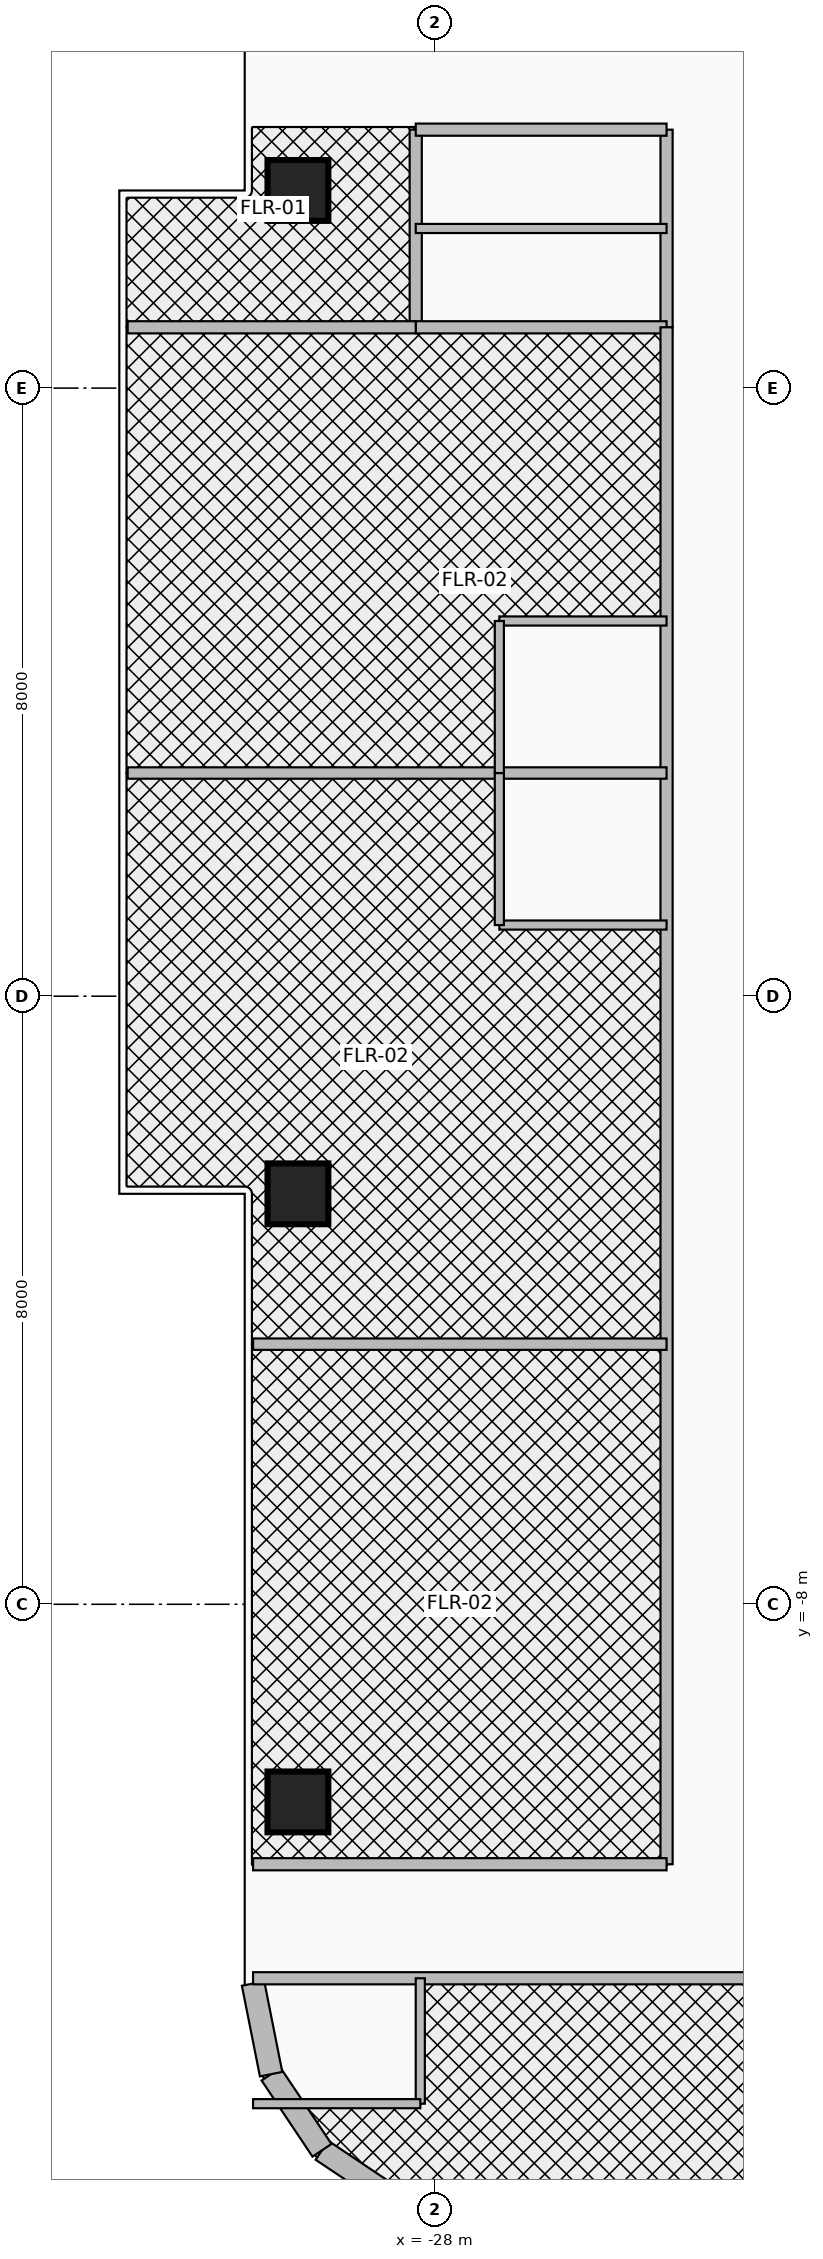
"""IFC4 building model, lengths in metres.
Left out: names, types, materials, properties, quantities, classifications, styles, units other than length and angle.
Written with IfcOpenShell. Run it as: python <this file> out.ifc"""

import sys

from ifc_helpers import new_model, si_unit, direction, frame, frame_2d, origin, origin_2d, place, context, subcontext, project, spatial, rectangle, extrude, source, transform, mapped, element, fill, save


model = new_model("IFC4")
c1 = context("Model", 3, precision=1e-05, world=origin(), true_north=direction((0.0, 1.0)))
c2 = subcontext(c1, "Body", "Model", "MODEL_VIEW")
j1 = project(units=[si_unit("LENGTHUNIT", "METRE"), si_unit("PLANEANGLEUNIT", "RADIAN")], contexts=[c1])
p1 = place(None, origin())
s1 = spatial("IfcSite", under=j1, at=p1, CompositionType="ELEMENT")
p2 = place(p1, origin())
s2 = spatial("IfcBuilding", under=s1, at=p2, CompositionType="ELEMENT")
p3 = place(p2, frame((0.0, 0.0, 240.5)))
s3 = spatial("IfcBuildingStorey", under=s2, at=p3, CompositionType="ELEMENT", Elevation=240.5)
m1 = source(origin(), c2, "Body", "SweptSolid", [
    extrude(rectangle(XDim=0.8, YDim=0.8, at=origin_2d()), origin(), (0.0, 0.0, 1.0), 3.5),
])
for number, where, z_axis, x_axis in (
    (1, (-29.8, -10.6, 0.0), (0.0, 0.0, 1.0), (1.0, 0.0, 0.0)),
    (2, (-29.8, -2.6, 0.0), (0.0, 0.0, 1.0), (1.0, 0.0, 0.0)),
    (3, (-29.8, 10.6, 0.0), (0.0, 0.0, 1.0), (1.0, 0.0, 0.0)),
):
    element("IfcColumn", number, at=place(p3, frame(where, z_axis=z_axis, x_axis=x_axis)), inside=s3, PredefinedType="COLUMN", context=c2, shape_type="MappedRepresentation", body=[
        mapped(m1, transform((0.0, 0.0, 0.0), x_axis=(1.0, 0.0, 0.0), y_axis=(0.0, 1.0, 0.0), z_axis=(0.0, 0.0, 1.0), scale=1.0)),
    ])
for number, where, z_axis, x_axis in (
    (4, (-28.482, -15.853, 0.0), (0.0, 0.0, 1.0), (-0.831, 0.556, 0.0)),
    (5, (-29.483, -15.183, 0.0), (0.0, 0.0, 1.0), (-0.556, 0.831, 0.0)),
):
    element("IfcWall", number, at=place(p3, frame(where, z_axis=z_axis, x_axis=x_axis)), inside=s3, PredefinedType="SOLIDWALL", context=c2, shape_type="SweptSolid", body=[
        extrude(rectangle(XDim=1.205, YDim=0.3, at=frame_2d((0.603, 0.0))), origin(), (0.0, 0.0, 1.0), 3.26),
    ])
p4 = place(p3, frame((-30.153, -14.182, 0.0), z_axis=(0.0, 0.0, 1.0), x_axis=(-0.194996050505, 0.980804027463, 0.0)))
e6 = element("IfcWall", 6, at=p4, inside=s3, PredefinedType="SOLIDWALL", context=c2, shape_type="SweptSolid", body=[
    extrude(rectangle(XDim=1.216, YDim=0.3, at=frame_2d((0.608, 0.0))), origin(), (0.0, 0.0, 1.0), 3.26),
])
p5 = place(p3, frame((-28.25, 8.8, 0.0), z_axis=(0.0, 0.0, 1.0), x_axis=(0.0, 1.0, 0.0)))
e7 = element("IfcWall", 7, at=p5, inside=s3, PredefinedType="PARTITIONING", context=c2, shape_type="SweptSolid", body=[
    extrude(rectangle(XDim=2.6, YDim=0.16, at=frame_2d((1.3, 0.0))), origin(), (0.0, 0.0, 1.0), 2.544),
])
p6 = place(p3, frame((-24.95, 8.8, 0.0), z_axis=(0.0, 0.0, 1.0), x_axis=(0.0, 1.0, 0.0)))
e8 = element("IfcWall", 8, at=p6, inside=s3, PredefinedType="PARTITIONING", context=c2, shape_type="SweptSolid", body=[
    extrude(rectangle(XDim=2.6, YDim=0.16, at=frame_2d((1.3, 0.0))), origin(), (0.0, 0.0, 1.0), 2.544),
])
p7 = place(p6, frame((0.3, 0.0, 0.0)))
e9 = element("IfcOpeningElement", 9, at=p7, cuts=e8, PredefinedType="OPENING", context=c2, shape_type="SweptSolid", body=[
    extrude(rectangle(XDim=0.85, YDim=2.1, at=frame_2d((0.425, 1.05))), frame((0.0, 0.095, 0.0), z_axis=(0.0, -1.0, 0.0), x_axis=(1.0, 0.0, 0.0)), (0.0, 0.0, 1.0), 0.19),
])
p8 = place(p6, frame((1.45, 0.0, 0.0)))
e10 = element("IfcOpeningElement", 10, at=p8, cuts=e8, PredefinedType="OPENING", context=c2, shape_type="SweptSolid", body=[
    extrude(rectangle(XDim=0.85, YDim=2.1, at=frame_2d((0.425, 1.05))), frame((0.0, 0.095, 0.0), z_axis=(0.0, -1.0, 0.0), x_axis=(1.0, 0.0, 0.0)), (0.0, 0.0, 1.0), 0.19),
])
for number, where, z_axis, x_axis in (
    (11, (-28.25, 8.8, 0.0), (0.0, 0.0, 1.0), (1.0, 0.0, 0.0)),
    (12, (-28.25, 11.4, 0.0), (0.0, 0.0, 1.0), (1.0, 0.0, 0.0)),
):
    element("IfcWall", number, at=place(p3, frame(where, z_axis=z_axis, x_axis=x_axis)), inside=s3, PredefinedType="PARTITIONING", context=c2, shape_type="SweptSolid", body=[
        extrude(rectangle(XDim=3.3, YDim=0.16, at=frame_2d((1.65, 0.0))), origin(), (0.0, 0.0, 1.0), 3.26),
    ])
p9 = place(p3, frame((-28.25, 10.1, 0.0), z_axis=(0.0, 0.0, 1.0), x_axis=(1.0, 0.0, 0.0)))
e13 = element("IfcWall", 13, at=p9, inside=s3, PredefinedType="PARTITIONING", context=c2, shape_type="SweptSolid", body=[
    extrude(rectangle(XDim=3.3, YDim=0.12, at=frame_2d((1.65, 0.0))), origin(), (0.0, 0.0, 1.0), 3.26),
])
p10 = place(p3, frame((-24.95, -11.42, 0.0), z_axis=(0.0, 0.0, 1.0), x_axis=(0.0, 1.0, 0.0)))
e14 = element("IfcWall", 14, at=p10, inside=s3, PredefinedType="PARTITIONING", context=c2, shape_type="SweptSolid", body=[
    extrude(rectangle(XDim=20.22, YDim=0.16, at=frame_2d((10.11, 0.0))), origin(), (0.0, 0.0, 1.0), 2.544),
])
p11 = place(p10, frame((2.521, 0.0, 0.0)))
e15 = element("IfcOpeningElement", 15, at=p11, cuts=e14, PredefinedType="OPENING", context=c2, shape_type="SweptSolid", body=[
    extrude(rectangle(XDim=1.8, YDim=2.15, at=frame_2d((0.9, 1.075))), frame((0.0, 0.095, 0.0), z_axis=(0.0, -1.0, 0.0), x_axis=(1.0, 0.0, 0.0)), (0.0, 0.0, 1.0), 0.19),
])
p12 = place(p10, frame((9.124, 0.0, 0.0)))
e16 = element("IfcOpeningElement", 16, at=p12, cuts=e14, PredefinedType="OPENING", context=c2, shape_type="SweptSolid", body=[
    extrude(rectangle(XDim=0.95, YDim=2.15, at=frame_2d((0.475, 1.075))), frame((0.0, 0.095, 0.0), z_axis=(0.0, -1.0, 0.0), x_axis=(1.0, 0.0, 0.0)), (0.0, 0.0, 1.0), 0.19),
])
p13 = place(p10, frame((17.813, 0.0, 0.0)))
e17 = element("IfcOpeningElement", 17, at=p13, cuts=e14, PredefinedType="OPENING", context=c2, shape_type="SweptSolid", body=[
    extrude(rectangle(XDim=0.95, YDim=2.15, at=frame_2d((0.475, 1.075))), frame((0.0, 0.095, 0.0), z_axis=(0.0, -1.0, 0.0), x_axis=(1.0, 0.0, 0.0)), (0.0, 0.0, 1.0), 0.19),
])
p14 = place(p3, frame((-32.04, 8.8, 0.0), z_axis=(0.0, 0.0, 1.0), x_axis=(1.0, 0.0, 0.0)))
e18 = element("IfcWall", 18, at=p14, inside=s3, PredefinedType="PARTITIONING", context=c2, shape_type="SweptSolid", body=[
    extrude(rectangle(XDim=3.79, YDim=0.16, at=frame_2d((1.895, 0.0))), origin(), (0.0, 0.0, 1.0), 2.706),
])
p15 = place(p14, frame((1.445, 0.0, 0.0)))
e19 = element("IfcOpeningElement", 19, at=p15, cuts=e18, PredefinedType="OPENING", context=c2, shape_type="SweptSolid", body=[
    extrude(rectangle(XDim=0.9, YDim=2.1, at=frame_2d((0.45, 1.05))), frame((0.0, 0.095, 0.0), z_axis=(0.0, -1.0, 0.0), x_axis=(1.0, 0.0, 0.0)), (0.0, 0.0, 1.0), 0.19),
])
p16 = place(p3, frame((-30.39, -4.578, 0.0), z_axis=(0.0, 0.0, 1.0), x_axis=(1.0, 0.0, 0.0)))
e20 = element("IfcWall", 20, at=p16, inside=s3, PredefinedType="PARTITIONING", context=c2, shape_type="SweptSolid", body=[
    extrude(rectangle(XDim=5.44, YDim=0.15, at=frame_2d((2.72, 0.0))), origin(), (0.0, 0.0, 1.0), 2.706),
])
p17 = place(p3, frame((-32.04, 2.936, 0.0), z_axis=(0.0, 0.0, 1.0), x_axis=(1.0, 0.0, 0.0)))
e21 = element("IfcWall", 21, at=p17, inside=s3, PredefinedType="PARTITIONING", context=c2, shape_type="SweptSolid", body=[
    extrude(rectangle(XDim=7.09, YDim=0.15, at=frame_2d((3.545, 0.0))), origin(), (0.0, 0.0, 1.0), 2.706),
])
p18 = place(p3, frame((-27.15, 0.936, 0.0), z_axis=(0.0, 0.0, 1.0), x_axis=(1.0, 0.0, 0.0)))
e22 = element("IfcWall", 22, at=p18, inside=s3, PredefinedType="PARTITIONING", context=c2, shape_type="SweptSolid", body=[
    extrude(rectangle(XDim=2.2, YDim=0.12, at=frame_2d((1.1, 0.0))), origin(), (0.0, 0.0, 1.0), 2.839),
])
p19 = place(p3, frame((-27.15, 0.936, 0.0), z_axis=(0.0, 0.0, 1.0), x_axis=(0.0, 1.0, 0.0)))
e23 = element("IfcWall", 23, at=p19, inside=s3, PredefinedType="PARTITIONING", context=c2, shape_type="SweptSolid", body=[
    extrude(rectangle(XDim=2.0, YDim=0.12, at=frame_2d((1.0, 0.0))), origin(), (0.0, 0.0, 1.0), 2.839),
])
p20 = place(p19, frame((0.575, 0.0, 0.0)))
e24 = element("IfcOpeningElement", 24, at=p20, cuts=e23, PredefinedType="OPENING", context=c2, shape_type="SweptSolid", body=[
    extrude(rectangle(XDim=0.85, YDim=2.1, at=frame_2d((0.425, 1.05))), frame((0.0, 0.075, 0.0), z_axis=(0.0, -1.0, 0.0), x_axis=(1.0, 0.0, 0.0)), (0.0, 0.0, 1.0), 0.15),
])
p21 = place(p3, frame((-27.15, 4.936, 0.0), z_axis=(0.0, 0.0, 1.0), x_axis=(1.0, 0.0, 0.0)))
e25 = element("IfcWall", 25, at=p21, inside=s3, PredefinedType="PARTITIONING", context=c2, shape_type="SweptSolid", body=[
    extrude(rectangle(XDim=2.2, YDim=0.12, at=frame_2d((1.1, 0.0))), origin(), (0.0, 0.0, 1.0), 3.26),
])
p22 = place(p3, frame((-27.15, 2.936, 0.0), z_axis=(0.0, 0.0, 1.0), x_axis=(0.0, 1.0, 0.0)))
e26 = element("IfcWall", 26, at=p22, inside=s3, PredefinedType="PARTITIONING", context=c2, shape_type="SweptSolid", body=[
    extrude(rectangle(XDim=2.0, YDim=0.12, at=frame_2d((1.0, 0.0))), origin(), (0.0, 0.0, 1.0), 2.839),
])
p23 = place(p22, frame((0.575, 0.0, 0.0)))
e27 = element("IfcOpeningElement", 27, at=p23, cuts=e26, PredefinedType="OPENING", context=c2, shape_type="SweptSolid", body=[
    extrude(rectangle(XDim=0.85, YDim=2.1, at=frame_2d((0.425, 1.05))), frame((0.0, 0.075, 0.0), z_axis=(0.0, -1.0, 0.0), x_axis=(1.0, 0.0, 0.0)), (0.0, 0.0, 1.0), 0.15),
])
p24 = place(p3, frame((-30.39, -12.92, 0.0), z_axis=(0.0, 0.0, 1.0), x_axis=(1.0, 0.0, 0.0)))
e28 = element("IfcWall", 28, at=p24, inside=s3, PredefinedType="PARTITIONING", context=c2, shape_type="SweptSolid", body=[
    extrude(rectangle(XDim=20.78, YDim=0.16, at=frame_2d((10.39, 0.0))), origin(), (0.0, 0.0, 1.0), 2.634),
])
p25 = place(p24, frame((6.5, 0.0, 0.0)))
e29 = element("IfcOpeningElement", 29, at=p25, cuts=e28, PredefinedType="OPENING", context=c2, shape_type="SweptSolid", body=[
    extrude(rectangle(XDim=0.95, YDim=2.15, at=frame_2d((0.475, 1.075))), frame((0.0, 0.095, 0.0), z_axis=(0.0, -1.0, 0.0), x_axis=(1.0, 0.0, 0.0)), (0.0, 0.0, 1.0), 0.19),
])
p26 = place(p24, frame((16.73, 0.0, 0.0)))
e30 = element("IfcOpeningElement", 30, at=p26, cuts=e28, PredefinedType="OPENING", context=c2, shape_type="SweptSolid", body=[
    extrude(rectangle(XDim=0.95, YDim=2.15, at=frame_2d((0.475, 1.075))), frame((0.0, 0.095, 0.0), z_axis=(0.0, -1.0, 0.0), x_axis=(1.0, 0.0, 0.0)), (0.0, 0.0, 1.0), 0.19),
])
p27 = place(p3, frame((-28.19, -14.57, 0.0), z_axis=(0.0, 0.0, 1.0), x_axis=(0.0, 1.0, 0.0)))
e31 = element("IfcWall", 31, at=p27, inside=s3, PredefinedType="PARTITIONING", context=c2, shape_type="SweptSolid", body=[
    extrude(rectangle(XDim=1.65, YDim=0.12, at=frame_2d((0.825, 0.0))), origin(), (0.0, 0.0, 1.0), 3.26),
])
p28 = place(p3, frame((-30.39, -14.57, 0.0), z_axis=(0.0, 0.0, 1.0), x_axis=(1.0, 0.0, 0.0)))
e32 = element("IfcWall", 32, at=p28, inside=s3, PredefinedType="PARTITIONING", context=c2, shape_type="SweptSolid", body=[
    extrude(rectangle(XDim=2.2, YDim=0.12, at=frame_2d((1.1, 0.0))), origin(), (0.0, 0.0, 1.0), 3.26),
])
p29 = place(p28, frame((0.94, 0.0, 0.0)))
e33 = element("IfcOpeningElement", 33, at=p29, cuts=e32, PredefinedType="OPENING", context=c2, shape_type="SweptSolid", body=[
    extrude(rectangle(XDim=0.85, YDim=2.1, at=frame_2d((0.425, 1.05))), frame((0.0, 0.075, 0.0), z_axis=(0.0, -1.0, 0.0), x_axis=(1.0, 0.0, 0.0)), (0.0, 0.0, 1.0), 0.15),
])
p30 = place(p3, frame((-30.39, -11.42, 0.0), z_axis=(0.0, 0.0, 1.0), x_axis=(1.0, 0.0, 0.0)))
e34 = element("IfcWall", 34, at=p30, inside=s3, PredefinedType="PARTITIONING", context=c2, shape_type="SweptSolid", body=[
    extrude(rectangle(XDim=5.44, YDim=0.16, at=frame_2d((2.72, 0.0))), origin(), (0.0, 0.0, 1.0), 3.26),
])
p31 = place(p7, origin())
e35 = element("IfcDoor", 35, at=p31, inside=s3, OperationType="SINGLE_SWING_LEFT", PredefinedType="DOOR", context=c2, shape_type="SweptSolid", body=[
    extrude(rectangle(XDim=0.85, YDim=2.1, at=frame_2d((0.425, 1.05))), frame((0.0, 0.025, 0.0), z_axis=(0.0, -1.0, 0.0), x_axis=(1.0, 0.0, 0.0)), (0.0, 0.0, 1.0), 0.05),
])
fill(e9, e35)
p32 = place(p8, origin())
e36 = element("IfcDoor", 36, at=p32, inside=s3, OperationType="SINGLE_SWING_RIGHT", PredefinedType="DOOR", context=c2, shape_type="SweptSolid", body=[
    extrude(rectangle(XDim=0.85, YDim=2.1, at=frame_2d((0.425, 1.05))), frame((0.0, 0.025, 0.0), z_axis=(0.0, -1.0, 0.0), x_axis=(1.0, 0.0, 0.0)), (0.0, 0.0, 1.0), 0.05),
])
fill(e10, e36)
p33 = place(p15, frame((0.9, 0.0, 0.0), z_axis=(0.0, 0.0, 1.0), x_axis=(-1.0, 0.0, 0.0)))
e37 = element("IfcDoor", 37, at=p33, inside=s3, OperationType="SINGLE_SWING_LEFT", PredefinedType="DOOR", context=c2, shape_type="SweptSolid", body=[
    extrude(rectangle(XDim=0.9, YDim=2.1, at=frame_2d((0.45, 1.05))), frame((0.0, 0.025, 0.0), z_axis=(0.0, -1.0, 0.0), x_axis=(1.0, 0.0, 0.0)), (0.0, 0.0, 1.0), 0.05),
])
fill(e19, e37)
p34 = place(p11, origin())
e38 = element("IfcDoor", 38, at=p34, inside=s3, OperationType="DOUBLE_DOOR_SINGLE_SWING", PredefinedType="DOOR", context=c2, shape_type="SweptSolid", body=[
    extrude(rectangle(XDim=1.8, YDim=2.15, at=frame_2d((0.9, 1.075))), frame((0.0, 0.025, 0.0), z_axis=(0.0, -1.0, 0.0), x_axis=(1.0, 0.0, 0.0)), (0.0, 0.0, 1.0), 0.05),
])
fill(e15, e38)
p35 = place(p12, frame((0.95, 0.0, 0.0), z_axis=(0.0, 0.0, 1.0), x_axis=(-1.0, 0.0, 0.0)))
e39 = element("IfcDoor", 39, at=p35, inside=s3, OperationType="SINGLE_SWING_LEFT", PredefinedType="DOOR", context=c2, shape_type="SweptSolid", body=[
    extrude(rectangle(XDim=0.95, YDim=2.15, at=frame_2d((0.475, 1.075))), frame((0.0, 0.025, 0.0), z_axis=(0.0, -1.0, 0.0), x_axis=(1.0, 0.0, 0.0)), (0.0, 0.0, 1.0), 0.05),
])
fill(e16, e39)
p36 = place(p20, origin())
e40 = element("IfcDoor", 40, at=p36, inside=s3, OperationType="SINGLE_SWING_RIGHT", PredefinedType="DOOR", context=c2, shape_type="SweptSolid", body=[
    extrude(rectangle(XDim=0.85, YDim=2.1, at=frame_2d((0.425, 1.05))), frame((0.0, 0.025, 0.0), z_axis=(0.0, -1.0, 0.0), x_axis=(1.0, 0.0, 0.0)), (0.0, 0.0, 1.0), 0.05),
])
fill(e24, e40)
p37 = place(p13, frame((0.95, 0.0, 0.0), z_axis=(0.0, 0.0, 1.0), x_axis=(-1.0, 0.0, 0.0)))
e41 = element("IfcDoor", 41, at=p37, inside=s3, OperationType="SINGLE_SWING_LEFT", PredefinedType="DOOR", context=c2, shape_type="SweptSolid", body=[
    extrude(rectangle(XDim=0.95, YDim=2.15, at=frame_2d((0.475, 1.075))), frame((0.0, 0.025, 0.0), z_axis=(0.0, -1.0, 0.0), x_axis=(1.0, 0.0, 0.0)), (0.0, 0.0, 1.0), 0.05),
])
fill(e17, e41)
p38 = place(p23, origin())
e42 = element("IfcDoor", 42, at=p38, inside=s3, OperationType="SINGLE_SWING_RIGHT", PredefinedType="DOOR", context=c2, shape_type="SweptSolid", body=[
    extrude(rectangle(XDim=0.85, YDim=2.1, at=frame_2d((0.425, 1.05))), frame((0.0, 0.025, 0.0), z_axis=(0.0, -1.0, 0.0), x_axis=(1.0, 0.0, 0.0)), (0.0, 0.0, 1.0), 0.05),
])
fill(e27, e42)
p39 = place(p29, origin())
e43 = element("IfcDoor", 43, at=p39, inside=s3, OperationType="SINGLE_SWING_RIGHT", PredefinedType="DOOR", context=c2, shape_type="SweptSolid", body=[
    extrude(rectangle(XDim=0.85, YDim=2.1, at=frame_2d((0.425, 1.05))), frame((0.0, 0.025, 0.0), z_axis=(0.0, -1.0, 0.0), x_axis=(1.0, 0.0, 0.0)), (0.0, 0.0, 1.0), 0.05),
])
fill(e33, e43)
save(model, sys.argv[1])
